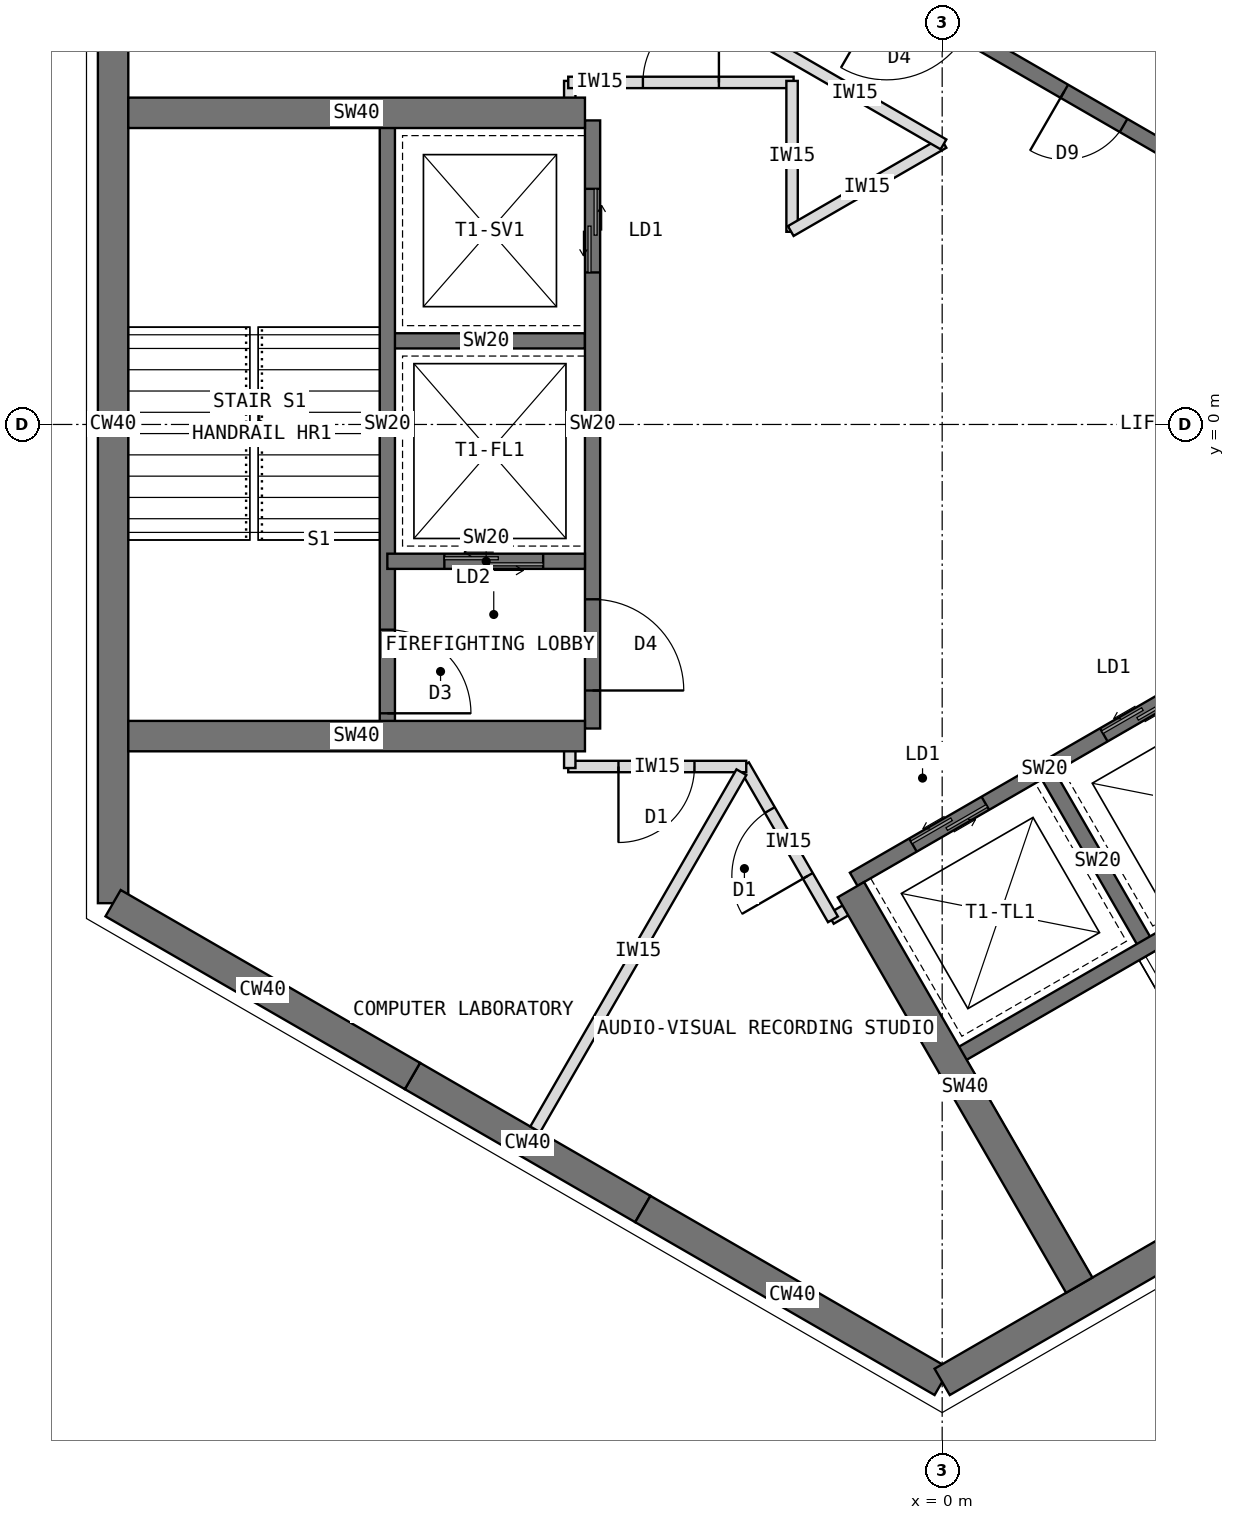
"""IFC4 building model, lengths in metres.
Left out: names, types, materials, properties, quantities, classifications, styles, units other than length and angle.
Written with IfcOpenShell. Run it as: python <this file> out.ifc"""

import sys

from ifc_helpers import new_model, si_unit, direction, frame, frame_2d, origin, place, context, subcontext, project, spatial, rectangle, extrude, element, fill, save


model = new_model("IFC4")
c1 = context("Model", 3, precision=1e-05, world=origin(), true_north=direction((0.0, 1.0)))
c2 = subcontext(c1, "Body", "Model", "MODEL_VIEW")
j1 = project(units=[si_unit("LENGTHUNIT", "METRE"), si_unit("PLANEANGLEUNIT", "RADIAN")], contexts=[c1])
p1 = place(None, origin())
s1 = spatial("IfcSite", under=j1, at=p1, CompositionType="ELEMENT")
p2 = place(p1, origin())
s2 = spatial("IfcBuilding", under=s1, at=p2, CompositionType="ELEMENT")
p3 = place(p2, frame((0.0, 0.0, 251.5)))
s3 = spatial("IfcBuildingStorey", under=s2, at=p3, CompositionType="ELEMENT", Elevation=251.5)
p4 = place(p3, frame((-10.908, 6.298, 0.0), z_axis=(0.0, 0.0, 1.0), x_axis=(0.0, -1.0, 0.0)))
e1 = element("IfcWall", 1, at=p4, inside=s3, PredefinedType="SHEAR", context=c2, shape_type="SweptSolid", body=[
    extrude(rectangle(XDim=12.596, YDim=0.4, at=frame_2d((6.298, 0.0))), origin(), (0.0, 0.0, 1.0), 4.0),
])
p5 = place(p3, frame((-10.908, -6.298, 0.0), z_axis=(0.0, 0.0, 1.0), x_axis=(0.866034513004, -0.499984222037, 0.0)))
e2 = element("IfcWall", 2, at=p5, inside=s3, PredefinedType="SHEAR", context=c2, shape_type="SweptSolid", body=[
    extrude(rectangle(XDim=4.548, YDim=0.4, at=frame_2d((2.274, 0.0))), origin(), (0.0, 0.0, 1.0), 4.0),
])
p6 = place(p3, frame((-6.97, -8.572, 0.0), z_axis=(0.0, 0.0, 1.0), x_axis=(0.866019471182, -0.500010275428, 0.0)))
e3 = element("IfcWall", 3, at=p6, inside=s3, PredefinedType="SHEAR", context=c2, shape_type="SweptSolid", body=[
    extrude(rectangle(XDim=3.5, YDim=0.4, at=frame_2d((1.75, 0.0))), origin(), (0.0, 0.0, 1.0), 4.0),
])
p7 = place(p3, frame((-3.939, -10.322, 0.0), z_axis=(0.0, 0.0, 1.0), x_axis=(0.866011268655, -0.500024481964, 0.0)))
e4 = element("IfcWall", 4, at=p7, inside=s3, PredefinedType="SHEAR", context=c2, shape_type="SweptSolid", body=[
    extrude(rectangle(XDim=4.548, YDim=0.4, at=frame_2d((2.274, 0.0))), origin(), (0.0, 0.0, 1.0), 4.0),
])
p8 = place(p3, frame((0.0, -12.596, 0.0), z_axis=(0.0, 0.0, 1.0), x_axis=(0.866021940709, 0.500005998175, 0.0)))
e5 = element("IfcWall", 5, at=p8, inside=s3, PredefinedType="SHEAR", context=c2, shape_type="SweptSolid", body=[
    extrude(rectangle(XDim=12.596, YDim=0.4, at=frame_2d((6.298, 0.0))), origin(), (0.0, 0.0, 1.0), 4.0),
])
p9 = place(p3, frame((5.764, 1.984, 0.0), z_axis=(0.0, 0.0, 1.0), x_axis=(-0.866026010844, 0.49999894854, 0.0)))
e6 = element("IfcWall", 6, at=p9, inside=s3, PredefinedType="SHEAR", context=c2, shape_type="SweptSolid", body=[
    extrude(rectangle(XDim=8.0, YDim=0.2, at=frame_2d((4.0, 0.0))), origin(), (0.0, 0.0, 1.0), 4.0),
])
p10 = place(p9, frame((6.3, 0.0, 0.0)))
e7 = element("IfcOpeningElement", 7, at=p10, cuts=e6, PredefinedType="OPENING", context=c2, shape_type="SweptSolid", body=[
    extrude(rectangle(XDim=1.2, YDim=2.1, at=frame_2d((0.6, 1.05))), frame((0.0, 0.11, 0.0), z_axis=(0.0, -1.0, 0.0), x_axis=(1.0, 0.0, 0.0)), (0.0, 0.0, 1.0), 0.22),
])
p11 = place(p9, frame((1.0, 0.0, 0.0)))
e8 = element("IfcOpeningElement", 8, at=p11, cuts=e6, PredefinedType="OPENING", context=c2, shape_type="SweptSolid", body=[
    extrude(rectangle(XDim=0.9, YDim=2.1, at=frame_2d((0.45, 1.05))), frame((0.0, 0.11, 0.0), z_axis=(0.0, -1.0, 0.0), x_axis=(1.0, 0.0, 0.0)), (0.0, 0.0, 1.0), 0.22),
])
p12 = place(p9, frame((3.9, 0.0, 0.0)))
e9 = element("IfcOpeningElement", 9, at=p12, cuts=e6, PredefinedType="OPENING", context=c2, shape_type="SweptSolid", body=[
    extrude(rectangle(XDim=0.9, YDim=2.1, at=frame_2d((0.45, 1.05))), frame((0.0, 0.11, 0.0), z_axis=(0.0, -1.0, 0.0), x_axis=(1.0, 0.0, 0.0)), (0.0, 0.0, 1.0), 0.22),
])
p13 = place(p3, frame((7.114, 4.322, 0.0), z_axis=(0.0, 0.0, 1.0), x_axis=(-0.866026010844, 0.49999894854, 0.0)))
e10 = element("IfcWall", 10, at=p13, inside=s3, PredefinedType="SHEAR", context=c2, shape_type="SweptSolid", body=[
    extrude(rectangle(XDim=8.0, YDim=0.2, at=frame_2d((4.0, 0.0))), origin(), (0.0, 0.0, 1.0), 4.0),
])
p14 = place(p13, frame((6.8, 0.0, 0.0)))
e11 = element("IfcOpeningElement", 11, at=p14, cuts=e10, PredefinedType="OPENING", context=c2, shape_type="SweptSolid", body=[
    extrude(rectangle(XDim=0.9, YDim=2.1, at=frame_2d((0.45, 1.05))), frame((0.0, 0.11, 0.0), z_axis=(0.0, -1.0, 0.0), x_axis=(1.0, 0.0, 0.0)), (0.0, 0.0, 1.0), 0.22),
])
p15 = place(p3, frame((-4.6, 4.0, 0.0), z_axis=(0.0, 0.0, 1.0), x_axis=(0.0, -1.0, 0.0)))
e12 = element("IfcWall", 12, at=p15, inside=s3, PredefinedType="SHEAR", context=c2, shape_type="SweptSolid", body=[
    extrude(rectangle(XDim=8.0, YDim=0.2, at=frame_2d((4.0, 0.0))), origin(), (0.0, 0.0, 1.0), 4.0),
])
p16 = place(p15, frame((6.3, 0.0, 0.0)))
e13 = element("IfcOpeningElement", 13, at=p16, cuts=e12, PredefinedType="OPENING", context=c2, shape_type="SweptSolid", body=[
    extrude(rectangle(XDim=1.2, YDim=2.1, at=frame_2d((0.6, 1.05))), frame((0.0, 0.11, 0.0), z_axis=(0.0, -1.0, 0.0), x_axis=(1.0, 0.0, 0.0)), (0.0, 0.0, 1.0), 0.22),
])
p17 = place(p15, frame((0.9, 0.0, 0.0)))
e14 = element("IfcOpeningElement", 14, at=p17, cuts=e12, PredefinedType="OPENING", context=c2, shape_type="SweptSolid", body=[
    extrude(rectangle(XDim=1.1, YDim=2.2, at=frame_2d((0.55, 1.1))), frame((0.0, 0.11, 0.0), z_axis=(0.0, -1.0, 0.0), x_axis=(1.0, 0.0, 0.0)), (0.0, 0.0, 1.0), 0.22),
])
p18 = place(p3, frame((-4.7, 1.1, 0.0), z_axis=(0.0, 0.0, 1.0), x_axis=(-1.0, 0.0, 0.0)))
e15 = element("IfcWall", 15, at=p18, inside=s3, PredefinedType="SHEAR", context=c2, shape_type="SweptSolid", body=[
    extrude(rectangle(XDim=2.6, YDim=0.2, at=frame_2d((1.3, 0.0))), origin(), (0.0, 0.0, 1.0), 4.0),
])
p19 = place(p3, frame((-4.7, -1.8, 0.0), z_axis=(0.0, 0.0, 1.0), x_axis=(-1.0, 0.0, 0.0)))
e16 = element("IfcWall", 16, at=p19, inside=s3, PredefinedType="SHEAR", context=c2, shape_type="SweptSolid", body=[
    extrude(rectangle(XDim=2.6, YDim=0.2, at=frame_2d((1.3, 0.0))), origin(), (0.0, 0.0, 1.0), 4.0),
])
p20 = place(p19, frame((0.55, 0.0, 0.0)))
e17 = element("IfcOpeningElement", 17, at=p20, cuts=e16, PredefinedType="OPENING", context=c2, shape_type="SweptSolid", body=[
    extrude(rectangle(XDim=1.3, YDim=2.2, at=frame_2d((0.65, 1.1))), frame((0.0, 0.11, 0.0), z_axis=(0.0, -1.0, 0.0), x_axis=(1.0, 0.0, 0.0)), (0.0, 0.0, 1.0), 0.22),
])
p21 = place(p3, frame((-7.3, 4.0, 0.0), z_axis=(0.0, 0.0, 1.0), x_axis=(0.0, -1.0, 0.0)))
e18 = element("IfcWall", 18, at=p21, inside=s3, PredefinedType="SHEAR", context=c2, shape_type="SweptSolid", body=[
    extrude(rectangle(XDim=8.0, YDim=0.2, at=frame_2d((4.0, 0.0))), origin(), (0.0, 0.0, 1.0), 4.0),
])
p22 = place(p21, frame((6.7, 0.0, 0.0)))
e19 = element("IfcOpeningElement", 19, at=p22, cuts=e18, PredefinedType="OPENING", context=c2, shape_type="SweptSolid", body=[
    extrude(rectangle(XDim=1.1, YDim=2.1, at=frame_2d((0.55, 1.05))), frame((0.0, 0.11, 0.0), z_axis=(0.0, -1.0, 0.0), x_axis=(1.0, 0.0, 0.0)), (0.0, 0.0, 1.0), 0.22),
])
for number, where, z_axis, x_axis in (
    (20, (-4.7, -4.1, 0.0), (0.0, 0.0, 1.0), (-1.0, 0.0, 0.0)),
    (21, (-4.7, 4.1, 0.0), (0.0, 0.0, 1.0), (-1.0, 0.0, 0.0)),
):
    element("IfcWall", number, at=place(p3, frame(where, z_axis=z_axis, x_axis=x_axis)), inside=s3, PredefinedType="SHEAR", context=c2, shape_type="SweptSolid", body=[
        extrude(rectangle(XDim=6.008, YDim=0.4, at=frame_2d((3.004, 0.0))), origin(), (0.0, 0.0, 1.0), 4.0),
    ])
p23 = place(p3, frame((-1.164, -5.984, 0.0), z_axis=(0.0, 0.0, 1.0), x_axis=(0.866026010844, 0.49999894854, 0.0)))
e22 = element("IfcWall", 22, at=p23, inside=s3, PredefinedType="SHEAR", context=c2, shape_type="SweptSolid", body=[
    extrude(rectangle(XDim=8.0, YDim=0.2, at=frame_2d((4.0, 0.0))), origin(), (0.0, 0.0, 1.0), 4.0),
])
p24 = place(p23, frame((6.3, 0.0, 0.0)))
e23 = element("IfcOpeningElement", 23, at=p24, cuts=e22, PredefinedType="OPENING", context=c2, shape_type="SweptSolid", body=[
    extrude(rectangle(XDim=1.2, YDim=2.1, at=frame_2d((0.6, 1.05))), frame((0.0, 0.11, 0.0), z_axis=(0.0, -1.0, 0.0), x_axis=(1.0, 0.0, 0.0)), (0.0, 0.0, 1.0), 0.22),
])
p25 = place(p23, frame((0.9, 0.0, 0.0)))
e24 = element("IfcOpeningElement", 24, at=p25, cuts=e22, PredefinedType="OPENING", context=c2, shape_type="SweptSolid", body=[
    extrude(rectangle(XDim=1.1, YDim=2.2, at=frame_2d((0.55, 1.1))), frame((0.0, 0.11, 0.0), z_axis=(0.0, -1.0, 0.0), x_axis=(1.0, 0.0, 0.0)), (0.0, 0.0, 1.0), 0.22),
])
p26 = place(p23, frame((3.8, 0.0, 0.0)))
e25 = element("IfcOpeningElement", 25, at=p26, cuts=e22, PredefinedType="OPENING", context=c2, shape_type="SweptSolid", body=[
    extrude(rectangle(XDim=1.1, YDim=2.2, at=frame_2d((0.55, 1.1))), frame((0.0, 0.11, 0.0), z_axis=(0.0, -1.0, 0.0), x_axis=(1.0, 0.0, 0.0)), (0.0, 0.0, 1.0), 0.22),
])
p27 = place(p3, frame((1.397, -4.62, 0.0), z_axis=(0.0, 0.0, 1.0), x_axis=(0.499936506574, -0.866062058628, 0.0)))
e26 = element("IfcWall", 26, at=p27, inside=s3, PredefinedType="SHEAR", context=c2, shape_type="SweptSolid", body=[
    extrude(rectangle(XDim=2.6, YDim=0.2, at=frame_2d((1.3, 0.0))), origin(), (0.0, 0.0, 1.0), 4.0),
])
p28 = place(p3, frame((0.186, -8.322, 0.0), z_axis=(0.0, 0.0, 1.0), x_axis=(0.866026010844, 0.49999894854, 0.0)))
e27 = element("IfcWall", 27, at=p28, inside=s3, PredefinedType="SHEAR", context=c2, shape_type="SweptSolid", body=[
    extrude(rectangle(XDim=8.0, YDim=0.2, at=frame_2d((4.0, 0.0))), origin(), (0.0, 0.0, 1.0), 4.0),
])
p29 = place(p28, frame((6.7, 0.0, 0.0)))
e28 = element("IfcOpeningElement", 28, at=p29, cuts=e27, PredefinedType="OPENING", context=c2, shape_type="SweptSolid", body=[
    extrude(rectangle(XDim=1.1, YDim=2.1, at=frame_2d((0.55, 1.05))), frame((0.0, 0.11, 0.0), z_axis=(0.0, -1.0, 0.0), x_axis=(1.0, 0.0, 0.0)), (0.0, 0.0, 1.0), 0.22),
])
p30 = place(p3, frame((-1.201, -6.12, 0.0), z_axis=(0.0, 0.0, 1.0), x_axis=(0.499997979876, -0.866026570101, 0.0)))
e29 = element("IfcWall", 29, at=p30, inside=s3, PredefinedType="SHEAR", context=c2, shape_type="SweptSolid", body=[
    extrude(rectangle(XDim=6.008, YDim=0.4, at=frame_2d((3.004, 0.0))), origin(), (0.0, 0.0, 1.0), 4.0),
])
p31 = place(p3, frame((-1.092, -6.289, 0.0), z_axis=(0.0, 0.0, 1.0), x_axis=(-0.866138304741, -0.499804398801, 0.0)))
e30 = element("IfcWall", 30, at=p31, inside=s3, PredefinedType="PARTITIONING", context=c2, shape_type="SweptSolid", body=[
    extrude(rectangle(XDim=0.43, YDim=0.15, at=frame_2d((0.215, 0.0))), origin(), (0.0, 0.0, 1.0), 3.8),
])
p32 = place(p3, frame((-1.437, -6.511, 0.0), z_axis=(0.0, 0.0, 1.0), x_axis=(-0.500074377092, 0.865982457891, 0.0)))
e31 = element("IfcWall", 31, at=p32, inside=s3, PredefinedType="PARTITIONING", context=c2, shape_type="SweptSolid", body=[
    extrude(rectangle(XDim=2.342, YDim=0.15, at=frame_2d((1.171, 0.0))), origin(), (0.0, 0.0, 1.0), 3.8),
])
p33 = place(p32, frame((0.661, 0.0, 0.0)))
e32 = element("IfcOpeningElement", 32, at=p33, cuts=e31, PredefinedType="OPENING", context=c2, shape_type="SweptSolid", body=[
    extrude(rectangle(XDim=1.0, YDim=2.1, at=frame_2d((0.5, 1.05))), frame((0.0, 0.085, 0.0), z_axis=(0.0, -1.0, 0.0), x_axis=(1.0, 0.0, 0.0)), (0.0, 0.0, 1.0), 0.17),
])
p34 = place(p3, frame((-2.578, -4.5, 0.0), z_axis=(0.0, 0.0, 1.0), x_axis=(-1.0, 0.0, 0.0)))
e33 = element("IfcWall", 33, at=p34, inside=s3, PredefinedType="PARTITIONING", context=c2, shape_type="SweptSolid", body=[
    extrude(rectangle(XDim=2.342, YDim=0.15, at=frame_2d((1.171, 0.0))), origin(), (0.0, 0.0, 1.0), 3.8),
])
p35 = place(p34, frame((0.681, 0.0, 0.0)))
e34 = element("IfcOpeningElement", 34, at=p35, cuts=e33, PredefinedType="OPENING", context=c2, shape_type="SweptSolid", body=[
    extrude(rectangle(XDim=1.0, YDim=2.1, at=frame_2d((0.5, 1.05))), frame((0.0, 0.085, 0.0), z_axis=(0.0, -1.0, 0.0), x_axis=(1.0, 0.0, 0.0)), (0.0, 0.0, 1.0), 0.17),
])
for number, where, z_axis, x_axis in (
    (35, (-4.9, -4.52, 0.0), (0.0, 0.0, 1.0), (0.0, 1.0, 0.0)),
    (36, (-4.9, 4.09, 0.0), (0.0, 0.0, 1.0), (0.0, 1.0, 0.0)),
):
    element("IfcWall", number, at=place(p3, frame(where, z_axis=z_axis, x_axis=x_axis)), inside=s3, PredefinedType="PARTITIONING", context=c2, shape_type="SweptSolid", body=[
        extrude(rectangle(XDim=0.43, YDim=0.15, at=frame_2d((0.215, 0.0))), origin(), (0.0, 0.0, 1.0), 3.8),
    ])
p36 = place(p3, frame((-4.92, 4.5, 0.0), z_axis=(0.0, 0.0, 1.0), x_axis=(1.0, 0.0, 0.0)))
e37 = element("IfcWall", 37, at=p36, inside=s3, PredefinedType="PARTITIONING", context=c2, shape_type="SweptSolid", body=[
    extrude(rectangle(XDim=2.965, YDim=0.15, at=frame_2d((1.482, 0.0))), origin(), (0.0, 0.0, 1.0), 3.8),
])
p37 = place(p36, frame((0.982, 0.0, 0.0)))
e38 = element("IfcOpeningElement", 38, at=p37, cuts=e37, PredefinedType="OPENING", context=c2, shape_type="SweptSolid", body=[
    extrude(rectangle(XDim=1.0, YDim=2.1, at=frame_2d((0.5, 1.05))), frame((0.0, 0.085, 0.0), z_axis=(0.0, -1.0, 0.0), x_axis=(1.0, 0.0, 0.0)), (0.0, 0.0, 1.0), 0.17),
])
p38 = place(p3, frame((-1.975, 4.52, 0.0), z_axis=(0.0, 0.0, 1.0), x_axis=(0.0, -1.0, 0.0)))
e39 = element("IfcWall", 39, at=p38, inside=s3, PredefinedType="PARTITIONING", context=c2, shape_type="SweptSolid", body=[
    extrude(rectangle(XDim=1.985, YDim=0.15, at=frame_2d((0.993, 0.0))), origin(), (0.0, 0.0, 1.0), 3.8),
])
p39 = place(p3, frame((-1.992, 2.545, 0.0), z_axis=(0.0, 0.0, 1.0), x_axis=(0.866059450854, 0.499941024108, 0.0)))
e40 = element("IfcWall", 40, at=p39, inside=s3, PredefinedType="PARTITIONING", context=c2, shape_type="SweptSolid", body=[
    extrude(rectangle(XDim=2.321, YDim=0.15, at=frame_2d((1.16, 0.0))), origin(), (0.0, 0.0, 1.0), 3.8),
])
p40 = place(p3, frame((0.017, 3.685, 0.0), z_axis=(0.0, 0.0, 1.0), x_axis=(-0.866036099759, 0.499981473571, 0.0)))
e41 = element("IfcWall", 41, at=p40, inside=s3, PredefinedType="PARTITIONING", context=c2, shape_type="SweptSolid", body=[
    extrude(rectangle(XDim=2.692, YDim=0.15, at=frame_2d((1.346, 0.0))), origin(), (0.0, 0.0, 1.0), 3.8),
])
p41 = place(p3, frame((-2.641, -4.575, 0.0), z_axis=(0.0, 0.0, 1.0), x_axis=(-0.500010688608, -0.866019232626, 0.0)))
e42 = element("IfcWall", 42, at=p41, inside=s3, PredefinedType="PARTITIONING", context=c2, shape_type="SweptSolid", body=[
    extrude(rectangle(XDim=5.426, YDim=0.15, at=frame_2d((2.713, 0.0))), origin(), (0.0, 0.0, 1.0), 3.8),
])
p42 = place(p16, origin())
e43 = element("IfcDoor", 43, at=p42, inside=s3, OperationType="SINGLE_SWING_RIGHT", PredefinedType="DOOR", context=c2, shape_type="SweptSolid", body=[
    extrude(rectangle(XDim=1.2, YDim=2.1, at=frame_2d((0.6, 1.05))), frame((0.0, 0.025, 0.0), z_axis=(0.0, -1.0, 0.0), x_axis=(1.0, 0.0, 0.0)), (0.0, 0.0, 1.0), 0.05),
])
fill(e13, e43)
p43 = place(p20, origin())
e44 = element("IfcDoor", 44, at=p43, inside=s3, OperationType="DOUBLE_DOOR_SLIDING", PredefinedType="DOOR", context=c2, shape_type="SweptSolid", body=[
    extrude(rectangle(XDim=1.3, YDim=2.2, at=frame_2d((0.65, 1.1))), frame((0.0, 0.025, 0.0), z_axis=(0.0, -1.0, 0.0), x_axis=(1.0, 0.0, 0.0)), (0.0, 0.0, 1.0), 0.05),
])
fill(e17, e44)
p44 = place(p17, origin())
e45 = element("IfcDoor", 45, at=p44, inside=s3, OperationType="DOUBLE_DOOR_SLIDING", PredefinedType="DOOR", context=c2, shape_type="SweptSolid", body=[
    extrude(rectangle(XDim=1.1, YDim=2.2, at=frame_2d((0.55, 1.1))), frame((0.0, 0.025, 0.0), z_axis=(0.0, -1.0, 0.0), x_axis=(1.0, 0.0, 0.0)), (0.0, 0.0, 1.0), 0.05),
])
fill(e14, e45)
p45 = place(p22, origin())
e46 = element("IfcDoor", 46, at=p45, inside=s3, OperationType="SINGLE_SWING_RIGHT", PredefinedType="DOOR", context=c2, shape_type="SweptSolid", body=[
    extrude(rectangle(XDim=1.1, YDim=2.1, at=frame_2d((0.55, 1.05))), frame((0.0, 0.025, 0.0), z_axis=(0.0, -1.0, 0.0), x_axis=(1.0, 0.0, 0.0)), (0.0, 0.0, 1.0), 0.05),
])
fill(e19, e46)
p46 = place(p25, origin())
e47 = element("IfcDoor", 47, at=p46, inside=s3, OperationType="DOUBLE_DOOR_SLIDING", PredefinedType="DOOR", context=c2, shape_type="SweptSolid", body=[
    extrude(rectangle(XDim=1.1, YDim=2.2, at=frame_2d((0.55, 1.1))), frame((0.0, 0.025, 0.0), z_axis=(0.0, -1.0, 0.0), x_axis=(1.0, 0.0, 0.0)), (0.0, 0.0, 1.0), 0.05),
])
fill(e24, e47)
p47 = place(p26, origin())
e48 = element("IfcDoor", 48, at=p47, inside=s3, OperationType="DOUBLE_DOOR_SLIDING", PredefinedType="DOOR", context=c2, shape_type="SweptSolid", body=[
    extrude(rectangle(XDim=1.1, YDim=2.2, at=frame_2d((0.55, 1.1))), frame((0.0, 0.025, 0.0), z_axis=(0.0, -1.0, 0.0), x_axis=(1.0, 0.0, 0.0)), (0.0, 0.0, 1.0), 0.05),
])
fill(e25, e48)
p48 = place(p35, origin())
e49 = element("IfcDoor", 49, at=p48, inside=s3, OperationType="SINGLE_SWING_RIGHT", PredefinedType="DOOR", context=c2, shape_type="SweptSolid", body=[
    extrude(rectangle(XDim=1.0, YDim=2.1, at=frame_2d((0.5, 1.05))), frame((0.0, 0.025, 0.0), z_axis=(0.0, -1.0, 0.0), x_axis=(1.0, 0.0, 0.0)), (0.0, 0.0, 1.0), 0.05),
])
fill(e34, e49)
p49 = place(p33, origin())
e50 = element("IfcDoor", 50, at=p49, inside=s3, OperationType="SINGLE_SWING_LEFT", PredefinedType="DOOR", context=c2, shape_type="SweptSolid", body=[
    extrude(rectangle(XDim=1.0, YDim=2.1, at=frame_2d((0.5, 1.05))), frame((0.0, 0.025, 0.0), z_axis=(0.0, -1.0, 0.0), x_axis=(1.0, 0.0, 0.0)), (0.0, 0.0, 1.0), 0.05),
])
fill(e32, e50)
p50 = place(p37, origin())
e51 = element("IfcDoor", 51, at=p50, inside=s3, OperationType="SINGLE_SWING_RIGHT", PredefinedType="DOOR", context=c2, shape_type="SweptSolid", body=[
    extrude(rectangle(XDim=1.0, YDim=2.1, at=frame_2d((0.5, 1.05))), frame((0.0, 0.025, 0.0), z_axis=(0.0, -1.0, 0.0), x_axis=(1.0, 0.0, 0.0)), (0.0, 0.0, 1.0), 0.05),
])
fill(e38, e51)
p51 = place(p12, origin())
e52 = element("IfcDoor", 52, at=p51, inside=s3, OperationType="SINGLE_SWING_RIGHT", PredefinedType="DOOR", context=c2, shape_type="SweptSolid", body=[
    extrude(rectangle(XDim=0.9, YDim=2.1, at=frame_2d((0.45, 1.05))), frame((0.0, 0.025, 0.0), z_axis=(0.0, -1.0, 0.0), x_axis=(1.0, 0.0, 0.0)), (0.0, 0.0, 1.0), 0.05),
])
fill(e9, e52)
save(model, sys.argv[1])
